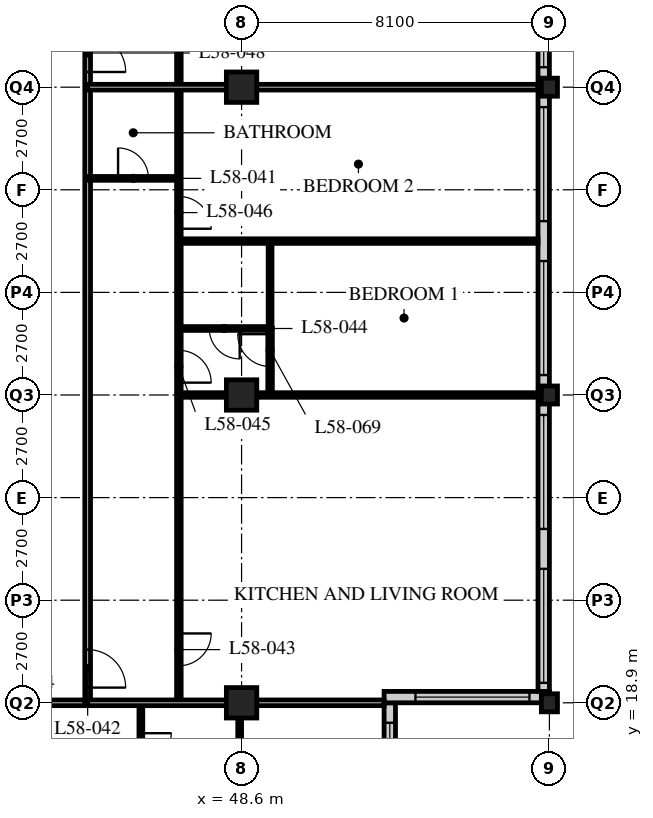
"""IFC4 building model, lengths in metres.
Left out: names, types, materials, properties, quantities, classifications, styles, units other than length and angle.
Written with IfcOpenShell. Run it as: python <this file> out.ifc"""

import sys

from ifc_helpers import new_model, si_unit, direction, frame, frame_2d, origin, origin_2d, place, context, subcontext, project, spatial, rectangle, hollow_rectangle, i_section, extrude, element, fill, save


model = new_model("IFC4")
c1 = context("Model", 3, precision=1e-05, world=origin(), true_north=direction((0.0, 1.0)))
c2 = subcontext(c1, "Body", "Model", "MODEL_VIEW")
j1 = project(units=[si_unit("LENGTHUNIT", "METRE"), si_unit("PLANEANGLEUNIT", "RADIAN")], contexts=[c1])
p1 = place(None, origin())
s1 = spatial("IfcSite", under=j1, at=p1, CompositionType="ELEMENT")
p2 = place(p1, origin())
s2 = spatial("IfcBuilding", under=s1, at=p2, CompositionType="ELEMENT")
p3 = place(p2, frame((0.0, 0.0, 224.4)))
s3 = spatial("IfcBuildingStorey", under=s2, at=p3, CompositionType="ELEMENT", Elevation=224.4)
for number, where, z_axis, x_axis in (
    (1, (48.6, 18.9, 0.0), (0.0, 0.0, 1.0), (1.0, 0.0, 0.0)),
    (2, (48.6, 27.0, 0.0), (0.0, 0.0, 1.0), (1.0, 0.0, 0.0)),
    (3, (48.6, 35.1, 0.0), (0.0, 0.0, 1.0), (1.0, 0.0, 0.0)),
):
    element("IfcColumn", number, at=place(p3, frame(where, z_axis=z_axis, x_axis=x_axis)), inside=s3, PredefinedType="COLUMN", context=c2, shape_type="SweptSolid", body=[
        extrude(hollow_rectangle(XDim=0.8, YDim=0.8, WallThickness=0.08, at=origin_2d()), origin(), (0.0, 0.0, 1.0), 3.6),
    ])
for number, where, z_axis, x_axis in (
    (4, (56.7, 18.9, 0.0), (0.0, 0.0, 1.0), (1.0, 0.0, 0.0)),
    (5, (56.7, 27.0, 0.0), (0.0, 0.0, 1.0), (1.0, 0.0, 0.0)),
    (6, (56.7, 35.1, 0.0), (0.0, 0.0, 1.0), (1.0, 0.0, 0.0)),
):
    element("IfcColumn", number, at=place(p3, frame(where, z_axis=z_axis, x_axis=x_axis)), inside=s3, PredefinedType="COLUMN", context=c2, shape_type="SweptSolid", body=[
        extrude(i_section(OverallWidth=0.424, OverallDepth=0.475, WebThickness=0.048, FlangeThickness=0.077, FilletRadius=0.015, at=origin_2d()), origin(), (0.0, 0.0, 1.0), 3.6),
    ])
p4 = place(p3, frame((52.5, 15.15, 0.0), z_axis=(0.0, 0.0, 1.0), x_axis=(0.0, 1.0, 0.0)))
e7 = element("IfcWall", 7, at=p4, inside=s3, PredefinedType="SOLIDWALL", context=c2, shape_type="SweptSolid", body=[
    extrude(rectangle(XDim=3.75, YDim=0.3, at=frame_2d((1.875, 0.0))), origin(), (0.0, 0.0, 1.0), 3.39),
])
p5 = place(p4, frame((0.225, 0.0, 0.6)))
e8 = element("IfcOpeningElement", 8, at=p5, cuts=e7, PredefinedType="OPENING", context=c2, shape_type="SweptSolid", body=[
    extrude(rectangle(XDim=3.0, YDim=2.0, at=frame_2d((1.5, 1.0))), frame((0.0, 0.16, 0.0), z_axis=(0.0, -1.0, 0.0), x_axis=(1.0, 0.0, 0.0)), (0.0, 0.0, 1.0), 0.32),
])
p6 = place(p3, frame((52.35, 19.05, 0.0), z_axis=(0.0, 0.0, 1.0), x_axis=(1.0, 0.0, 0.0)))
e9 = element("IfcWall", 9, at=p6, inside=s3, PredefinedType="SOLIDWALL", context=c2, shape_type="SweptSolid", body=[
    extrude(rectangle(XDim=4.35, YDim=0.3, at=frame_2d((2.175, 0.0))), origin(), (0.0, 0.0, 1.0), 3.39),
])
p7 = place(p6, frame((0.825, 0.0, 0.6)))
e10 = element("IfcOpeningElement", 10, at=p7, cuts=e9, PredefinedType="OPENING", context=c2, shape_type="SweptSolid", body=[
    extrude(rectangle(XDim=3.0, YDim=2.0, at=frame_2d((1.5, 1.0))), frame((0.0, 0.16, 0.0), z_axis=(0.0, -1.0, 0.0), x_axis=(1.0, 0.0, 0.0)), (0.0, 0.0, 1.0), 0.32),
])
p8 = place(p3, frame((56.55, 19.2, 0.0), z_axis=(0.0, 0.0, 1.0), x_axis=(0.0, 1.0, 0.0)))
e11 = element("IfcWall", 11, at=p8, inside=s3, PredefinedType="SOLIDWALL", context=c2, shape_type="SweptSolid", body=[
    extrude(rectangle(XDim=32.1, YDim=0.3, at=frame_2d((16.05, 0.0))), origin(), (0.0, 0.0, 1.0), 3.39),
])
p9 = place(p8, frame((0.225, 0.0, 0.6)))
e12 = element("IfcOpeningElement", 12, at=p9, cuts=e11, PredefinedType="OPENING", context=c2, shape_type="SweptSolid", body=[
    extrude(rectangle(XDim=3.0, YDim=2.0, at=frame_2d((1.5, 1.0))), frame((0.0, 0.16, 0.0), z_axis=(0.0, -1.0, 0.0), x_axis=(1.0, 0.0, 0.0)), (0.0, 0.0, 1.0), 0.32),
])
p10 = place(p8, frame((4.275, 0.0, 0.6)))
e13 = element("IfcOpeningElement", 13, at=p10, cuts=e11, PredefinedType="OPENING", context=c2, shape_type="SweptSolid", body=[
    extrude(rectangle(XDim=3.0, YDim=2.0, at=frame_2d((1.5, 1.0))), frame((0.0, 0.16, 0.0), z_axis=(0.0, -1.0, 0.0), x_axis=(1.0, 0.0, 0.0)), (0.0, 0.0, 1.0), 0.32),
])
p11 = place(p8, frame((8.325, 0.0, 0.6)))
e14 = element("IfcOpeningElement", 14, at=p11, cuts=e11, PredefinedType="OPENING", context=c2, shape_type="SweptSolid", body=[
    extrude(rectangle(XDim=3.0, YDim=2.0, at=frame_2d((1.5, 1.0))), frame((0.0, 0.16, 0.0), z_axis=(0.0, -1.0, 0.0), x_axis=(1.0, 0.0, 0.0)), (0.0, 0.0, 1.0), 0.32),
])
p12 = place(p8, frame((12.375, 0.0, 0.6)))
e15 = element("IfcOpeningElement", 15, at=p12, cuts=e11, PredefinedType="OPENING", context=c2, shape_type="SweptSolid", body=[
    extrude(rectangle(XDim=3.0, YDim=2.0, at=frame_2d((1.5, 1.0))), frame((0.0, 0.16, 0.0), z_axis=(0.0, -1.0, 0.0), x_axis=(1.0, 0.0, 0.0)), (0.0, 0.0, 1.0), 0.32),
])
p13 = place(p8, frame((16.425, 0.0, 0.6)))
e16 = element("IfcOpeningElement", 16, at=p13, cuts=e11, PredefinedType="OPENING", context=c2, shape_type="SweptSolid", body=[
    extrude(rectangle(XDim=3.0, YDim=2.0, at=frame_2d((1.5, 1.0))), frame((0.0, 0.16, 0.0), z_axis=(0.0, -1.0, 0.0), x_axis=(1.0, 0.0, 0.0)), (0.0, 0.0, 1.0), 0.32),
])
p14 = place(p8, frame((20.475, 0.0, 0.6)))
e17 = element("IfcOpeningElement", 17, at=p14, cuts=e11, PredefinedType="OPENING", context=c2, shape_type="SweptSolid", body=[
    extrude(rectangle(XDim=3.0, YDim=2.0, at=frame_2d((1.5, 1.0))), frame((0.0, 0.16, 0.0), z_axis=(0.0, -1.0, 0.0), x_axis=(1.0, 0.0, 0.0)), (0.0, 0.0, 1.0), 0.32),
])
p15 = place(p8, frame((24.525, 0.0, 0.6)))
e18 = element("IfcOpeningElement", 18, at=p15, cuts=e11, PredefinedType="OPENING", context=c2, shape_type="SweptSolid", body=[
    extrude(rectangle(XDim=3.0, YDim=2.0, at=frame_2d((1.5, 1.0))), frame((0.0, 0.16, 0.0), z_axis=(0.0, -1.0, 0.0), x_axis=(1.0, 0.0, 0.0)), (0.0, 0.0, 1.0), 0.32),
])
p16 = place(p8, frame((28.575, 0.0, 0.6)))
e19 = element("IfcOpeningElement", 19, at=p16, cuts=e11, PredefinedType="OPENING", context=c2, shape_type="SweptSolid", body=[
    extrude(rectangle(XDim=3.0, YDim=2.0, at=frame_2d((1.5, 1.0))), frame((0.0, 0.16, 0.0), z_axis=(0.0, -1.0, 0.0), x_axis=(1.0, 0.0, 0.0)), (0.0, 0.0, 1.0), 0.32),
])
p17 = place(p3, frame((8.1, 18.9, 0.0), z_axis=(0.0, 0.0, 1.0), x_axis=(1.0, 0.0, 0.0)))
e20 = element("IfcWall", 20, at=p17, inside=s3, PredefinedType="PARTITIONING", context=c2, shape_type="SweptSolid", body=[
    extrude(rectangle(XDim=36.45, YDim=0.15, at=frame_2d((18.225, 0.0))), origin(), (0.0, 0.0, 1.0), 2.628),
])
p18 = place(p17, frame((4.45, 0.0, 0.0)))
e21 = element("IfcOpeningElement", 21, at=p18, cuts=e20, PredefinedType="OPENING", context=c2, shape_type="SweptSolid", body=[
    extrude(rectangle(XDim=1.0, YDim=2.1, at=frame_2d((0.5, 1.05))), frame((0.0, 0.085, 0.0), z_axis=(0.0, -1.0, 0.0), x_axis=(1.0, 0.0, 0.0)), (0.0, 0.0, 1.0), 0.17),
])
p19 = place(p17, frame((17.1, 0.0, 0.0)))
e22 = element("IfcOpeningElement", 22, at=p19, cuts=e20, PredefinedType="OPENING", context=c2, shape_type="SweptSolid", body=[
    extrude(rectangle(XDim=1.0, YDim=2.1, at=frame_2d((0.5, 1.05))), frame((0.0, 0.085, 0.0), z_axis=(0.0, -1.0, 0.0), x_axis=(1.0, 0.0, 0.0)), (0.0, 0.0, 1.0), 0.17),
])
p20 = place(p17, frame((29.05, 0.0, 0.0)))
e23 = element("IfcOpeningElement", 23, at=p20, cuts=e20, PredefinedType="OPENING", context=c2, shape_type="SweptSolid", body=[
    extrude(rectangle(XDim=1.0, YDim=2.1, at=frame_2d((0.5, 1.05))), frame((0.0, 0.085, 0.0), z_axis=(0.0, -1.0, 0.0), x_axis=(1.0, 0.0, 0.0)), (0.0, 0.0, 1.0), 0.17),
])
p21 = place(p17, frame((2.625, 0.0, 0.0)))
e24 = element("IfcOpeningElement", 24, at=p21, cuts=e20, PredefinedType="OPENING", context=c2, shape_type="SweptSolid", body=[
    extrude(rectangle(XDim=1.0, YDim=2.1, at=frame_2d((0.5, 1.05))), frame((0.0, 0.085, 0.0), z_axis=(0.0, -1.0, 0.0), x_axis=(1.0, 0.0, 0.0)), (0.0, 0.0, 1.0), 0.17),
])
p22 = place(p17, frame((33.925, 0.0, 0.0)))
e25 = element("IfcOpeningElement", 25, at=p22, cuts=e20, PredefinedType="OPENING", context=c2, shape_type="SweptSolid", body=[
    extrude(rectangle(XDim=1.0, YDim=2.1, at=frame_2d((0.5, 1.05))), frame((0.0, 0.085, 0.0), z_axis=(0.0, -1.0, 0.0), x_axis=(1.0, 0.0, 0.0)), (0.0, 0.0, 1.0), 0.17),
])
p23 = place(p3, frame((44.55, 18.9, 0.0), z_axis=(0.0, 0.0, 1.0), x_axis=(0.0, 1.0, 0.0)))
e26 = element("IfcWall", 26, at=p23, inside=s3, PredefinedType="PARTITIONING", context=c2, shape_type="SweptSolid", body=[
    extrude(rectangle(XDim=24.3, YDim=0.15, at=frame_2d((12.15, 0.0))), origin(), (0.0, 0.0, 1.0), 3.39),
])
p24 = place(p23, frame((0.4, 0.0, 0.0)))
e27 = element("IfcOpeningElement", 27, at=p24, cuts=e26, PredefinedType="OPENING", context=c2, shape_type="SweptSolid", body=[
    extrude(rectangle(XDim=1.0, YDim=2.1, at=frame_2d((0.5, 1.05))), frame((0.0, 0.085, 0.0), z_axis=(0.0, -1.0, 0.0), x_axis=(1.0, 0.0, 0.0)), (0.0, 0.0, 1.0), 0.17),
])
p25 = place(p23, frame((16.6, 0.0, 0.0)))
e28 = element("IfcOpeningElement", 28, at=p25, cuts=e26, PredefinedType="OPENING", context=c2, shape_type="SweptSolid", body=[
    extrude(rectangle(XDim=1.0, YDim=2.1, at=frame_2d((0.5, 1.05))), frame((0.0, 0.085, 0.0), z_axis=(0.0, -1.0, 0.0), x_axis=(1.0, 0.0, 0.0)), (0.0, 0.0, 1.0), 0.17),
])
p26 = place(p3, frame((46.95, 18.9, 0.0), z_axis=(0.0, 0.0, 1.0), x_axis=(0.0, 1.0, 0.0)))
e29 = element("IfcWall", 29, at=p26, inside=s3, PredefinedType="PARTITIONING", context=c2, shape_type="SweptSolid", body=[
    extrude(rectangle(XDim=24.3, YDim=0.12, at=frame_2d((12.15, 0.0))), origin(), (0.0, 0.0, 1.0), 3.39),
])
p27 = place(p26, frame((0.975, 0.0, 0.0)))
e30 = element("IfcOpeningElement", 30, at=p27, cuts=e29, PredefinedType="OPENING", context=c2, shape_type="SweptSolid", body=[
    extrude(rectangle(XDim=0.85, YDim=2.1, at=frame_2d((0.425, 1.05))), frame((0.0, 0.07, 0.0), z_axis=(0.0, -1.0, 0.0), x_axis=(1.0, 0.0, 0.0)), (0.0, 0.0, 1.0), 0.14),
])
p28 = place(p26, frame((8.425, 0.0, 0.0)))
e31 = element("IfcOpeningElement", 31, at=p28, cuts=e29, PredefinedType="OPENING", context=c2, shape_type="SweptSolid", body=[
    extrude(rectangle(XDim=0.85, YDim=2.1, at=frame_2d((0.425, 1.05))), frame((0.0, 0.07, 0.0), z_axis=(0.0, -1.0, 0.0), x_axis=(1.0, 0.0, 0.0)), (0.0, 0.0, 1.0), 0.14),
])
p29 = place(p26, frame((12.475, 0.0, 0.0)))
e32 = element("IfcOpeningElement", 32, at=p29, cuts=e29, PredefinedType="OPENING", context=c2, shape_type="SweptSolid", body=[
    extrude(rectangle(XDim=0.85, YDim=2.1, at=frame_2d((0.425, 1.05))), frame((0.0, 0.07, 0.0), z_axis=(0.0, -1.0, 0.0), x_axis=(1.0, 0.0, 0.0)), (0.0, 0.0, 1.0), 0.14),
])
p30 = place(p26, frame((17.175, 0.0, 0.0)))
e33 = element("IfcOpeningElement", 33, at=p30, cuts=e29, PredefinedType="OPENING", context=c2, shape_type="SweptSolid", body=[
    extrude(rectangle(XDim=0.85, YDim=2.1, at=frame_2d((0.425, 1.05))), frame((0.0, 0.07, 0.0), z_axis=(0.0, -1.0, 0.0), x_axis=(1.0, 0.0, 0.0)), (0.0, 0.0, 1.0), 0.14),
])
p31 = place(p26, frame((20.575, 0.0, 0.0)))
e34 = element("IfcOpeningElement", 34, at=p31, cuts=e29, PredefinedType="OPENING", context=c2, shape_type="SweptSolid", body=[
    extrude(rectangle(XDim=0.85, YDim=2.1, at=frame_2d((0.425, 1.05))), frame((0.0, 0.07, 0.0), z_axis=(0.0, -1.0, 0.0), x_axis=(1.0, 0.0, 0.0)), (0.0, 0.0, 1.0), 0.14),
])
p32 = place(p3, frame((44.55, 32.7, 0.0), z_axis=(0.0, 0.0, 1.0), x_axis=(1.0, 0.0, 0.0)))
e35 = element("IfcWall", 35, at=p32, inside=s3, PredefinedType="PARTITIONING", context=c2, shape_type="SweptSolid", body=[
    extrude(rectangle(XDim=2.4, YDim=0.1, at=frame_2d((1.2, 0.0))), origin(), (0.0, 0.0, 1.0), 3.39),
])
p33 = place(p32, frame((0.8, 0.0, 0.0)))
e36 = element("IfcOpeningElement", 36, at=p33, cuts=e35, PredefinedType="OPENING", context=c2, shape_type="SweptSolid", body=[
    extrude(rectangle(XDim=0.8, YDim=2.1, at=frame_2d((0.4, 1.05))), frame((0.0, 0.06, 0.0), z_axis=(0.0, -1.0, 0.0), x_axis=(1.0, 0.0, 0.0)), (0.0, 0.0, 1.0), 0.12),
])
p34 = place(p3, frame((46.95, 28.75, 0.0), z_axis=(0.0, 0.0, 1.0), x_axis=(1.0, 0.0, 0.0)))
e37 = element("IfcWall", 37, at=p34, inside=s3, PredefinedType="PARTITIONING", context=c2, shape_type="SweptSolid", body=[
    extrude(rectangle(XDim=2.4, YDim=0.1, at=frame_2d((1.2, 0.0))), origin(), (0.0, 0.0, 1.0), 3.39),
])
p35 = place(p34, frame((0.8, 0.0, 0.0)))
e38 = element("IfcOpeningElement", 38, at=p35, cuts=e37, PredefinedType="OPENING", context=c2, shape_type="SweptSolid", body=[
    extrude(rectangle(XDim=0.8, YDim=2.1, at=frame_2d((0.4, 1.05))), frame((0.0, 0.06, 0.0), z_axis=(0.0, -1.0, 0.0), x_axis=(1.0, 0.0, 0.0)), (0.0, 0.0, 1.0), 0.12),
])
p36 = place(p3, frame((49.35, 28.75, 0.0), z_axis=(0.0, 0.0, 1.0), x_axis=(0.0, 1.0, 0.0)))
e39 = element("IfcWall", 39, at=p36, inside=s3, PredefinedType="PARTITIONING", context=c2, shape_type="SweptSolid", body=[
    extrude(rectangle(XDim=2.3, YDim=0.1, at=frame_2d((1.15, 0.0))), origin(), (0.0, 0.0, 1.0), 3.39),
])
p37 = place(p3, frame((46.95, 27.0, 0.0), z_axis=(0.0, 0.0, 1.0), x_axis=(1.0, 0.0, 0.0)))
e40 = element("IfcWall", 40, at=p37, inside=s3, PredefinedType="PARTITIONING", context=c2, shape_type="SweptSolid", body=[
    extrude(rectangle(XDim=9.45, YDim=0.12, at=frame_2d((4.725, 0.0))), origin(), (0.0, 0.0, 1.0), 2.628),
])
p38 = place(p3, frame((46.95, 31.05, 0.0), z_axis=(0.0, 0.0, 1.0), x_axis=(1.0, 0.0, 0.0)))
e41 = element("IfcWall", 41, at=p38, inside=s3, PredefinedType="PARTITIONING", context=c2, shape_type="SweptSolid", body=[
    extrude(rectangle(XDim=9.45, YDim=0.12, at=frame_2d((4.725, 0.0))), origin(), (0.0, 0.0, 1.0), 3.39),
])
p39 = place(p3, frame((44.55, 35.1, 0.0), z_axis=(0.0, 0.0, 1.0), x_axis=(1.0, 0.0, 0.0)))
e42 = element("IfcWall", 42, at=p39, inside=s3, PredefinedType="PARTITIONING", context=c2, shape_type="SweptSolid", body=[
    extrude(rectangle(XDim=11.85, YDim=0.15, at=frame_2d((5.925, 0.0))), origin(), (0.0, 0.0, 1.0), 2.628),
])
p40 = place(p3, frame((45.95, 18.9, 0.0), z_axis=(0.0, 0.0, 1.0), x_axis=(0.0, -1.0, 0.0)))
e43 = element("IfcWall", 43, at=p40, inside=s3, PredefinedType="PARTITIONING", context=c2, shape_type="SweptSolid", body=[
    extrude(rectangle(XDim=2.4, YDim=0.1, at=frame_2d((1.2, 0.0))), origin(), (0.0, 0.0, 1.0), 3.39),
])
p41 = place(p40, frame((0.8, 0.0, 0.0)))
e44 = element("IfcOpeningElement", 44, at=p41, cuts=e43, PredefinedType="OPENING", context=c2, shape_type="SweptSolid", body=[
    extrude(rectangle(XDim=0.8, YDim=2.1, at=frame_2d((0.4, 1.05))), frame((0.0, 0.06, 0.0), z_axis=(0.0, -1.0, 0.0), x_axis=(1.0, 0.0, 0.0)), (0.0, 0.0, 1.0), 0.12),
])
p42 = place(p3, frame((48.55, 18.9, 0.0), z_axis=(0.0, 0.0, 1.0), x_axis=(0.0, -1.0, 0.0)))
e45 = element("IfcWall", 45, at=p42, inside=s3, PredefinedType="PARTITIONING", context=c2, shape_type="SweptSolid", body=[
    extrude(rectangle(XDim=2.4, YDim=0.1, at=frame_2d((1.2, 0.0))), origin(), (0.0, 0.0, 1.0), 2.628),
])
p43 = place(p3, frame((44.55, 18.9, 0.0), z_axis=(0.0, 0.0, 1.0), x_axis=(1.0, 0.0, 0.0)))
e46 = element("IfcWall", 46, at=p43, inside=s3, PredefinedType="PARTITIONING", context=c2, shape_type="SweptSolid", body=[
    extrude(rectangle(XDim=7.8, YDim=0.15, at=frame_2d((3.9, 0.0))), origin(), (0.0, 0.0, 1.0), 2.628),
])
p44 = place(p3, frame((49.35, 28.76, 0.0), z_axis=(0.0, 0.0, 1.0), x_axis=(0.0, -1.0, 0.0)))
e47 = element("IfcWall", 47, at=p44, inside=s3, PredefinedType="PARTITIONING", context=c2, shape_type="SweptSolid", body=[
    extrude(rectangle(XDim=1.76, YDim=0.12, at=frame_2d((0.88, 0.0))), origin(), (0.0, 0.0, 1.0), 3.39),
])
p45 = place(p44, frame((0.16, 0.0, 0.0)))
e48 = element("IfcOpeningElement", 48, at=p45, cuts=e47, PredefinedType="OPENING", context=c2, shape_type="SweptSolid", body=[
    extrude(rectangle(XDim=0.85, YDim=2.1, at=frame_2d((0.425, 1.05))), frame((0.0, 0.07, 0.0), z_axis=(0.0, -1.0, 0.0), x_axis=(1.0, 0.0, 0.0)), (0.0, 0.0, 1.0), 0.14),
])
p46 = place(p5, origin())
e49 = element("IfcWindow", 49, at=p46, inside=s3, PartitioningType="SINGLE_PANEL", PredefinedType="WINDOW", context=c2, shape_type="SweptSolid", body=[
    extrude(rectangle(XDim=3.0, YDim=2.0, at=frame_2d((1.5, 1.0))), frame((0.0, 0.03, 0.0), z_axis=(0.0, -1.0, 0.0), x_axis=(1.0, 0.0, 0.0)), (0.0, 0.0, 1.0), 0.06),
])
fill(e8, e49)
p47 = place(p7, origin())
e50 = element("IfcWindow", 50, at=p47, inside=s3, PartitioningType="SINGLE_PANEL", PredefinedType="WINDOW", context=c2, shape_type="SweptSolid", body=[
    extrude(rectangle(XDim=3.0, YDim=2.0, at=frame_2d((1.5, 1.0))), frame((0.0, 0.03, 0.0), z_axis=(0.0, -1.0, 0.0), x_axis=(1.0, 0.0, 0.0)), (0.0, 0.0, 1.0), 0.06),
])
fill(e10, e50)
p48 = place(p9, origin())
e51 = element("IfcWindow", 51, at=p48, inside=s3, PartitioningType="SINGLE_PANEL", PredefinedType="WINDOW", context=c2, shape_type="SweptSolid", body=[
    extrude(rectangle(XDim=3.0, YDim=2.0, at=frame_2d((1.5, 1.0))), frame((0.0, 0.03, 0.0), z_axis=(0.0, -1.0, 0.0), x_axis=(1.0, 0.0, 0.0)), (0.0, 0.0, 1.0), 0.06),
])
fill(e12, e51)
p49 = place(p10, origin())
e52 = element("IfcWindow", 52, at=p49, inside=s3, PartitioningType="SINGLE_PANEL", PredefinedType="WINDOW", context=c2, shape_type="SweptSolid", body=[
    extrude(rectangle(XDim=3.0, YDim=2.0, at=frame_2d((1.5, 1.0))), frame((0.0, 0.03, 0.0), z_axis=(0.0, -1.0, 0.0), x_axis=(1.0, 0.0, 0.0)), (0.0, 0.0, 1.0), 0.06),
])
fill(e13, e52)
p50 = place(p11, origin())
e53 = element("IfcWindow", 53, at=p50, inside=s3, PartitioningType="SINGLE_PANEL", PredefinedType="WINDOW", context=c2, shape_type="SweptSolid", body=[
    extrude(rectangle(XDim=3.0, YDim=2.0, at=frame_2d((1.5, 1.0))), frame((0.0, 0.03, 0.0), z_axis=(0.0, -1.0, 0.0), x_axis=(1.0, 0.0, 0.0)), (0.0, 0.0, 1.0), 0.06),
])
fill(e14, e53)
p51 = place(p12, origin())
e54 = element("IfcWindow", 54, at=p51, inside=s3, PartitioningType="SINGLE_PANEL", PredefinedType="WINDOW", context=c2, shape_type="SweptSolid", body=[
    extrude(rectangle(XDim=3.0, YDim=2.0, at=frame_2d((1.5, 1.0))), frame((0.0, 0.03, 0.0), z_axis=(0.0, -1.0, 0.0), x_axis=(1.0, 0.0, 0.0)), (0.0, 0.0, 1.0), 0.06),
])
fill(e15, e54)
p52 = place(p13, origin())
e55 = element("IfcWindow", 55, at=p52, inside=s3, PartitioningType="SINGLE_PANEL", PredefinedType="WINDOW", context=c2, shape_type="SweptSolid", body=[
    extrude(rectangle(XDim=3.0, YDim=2.0, at=frame_2d((1.5, 1.0))), frame((0.0, 0.03, 0.0), z_axis=(0.0, -1.0, 0.0), x_axis=(1.0, 0.0, 0.0)), (0.0, 0.0, 1.0), 0.06),
])
fill(e16, e55)
p53 = place(p33, origin())
e56 = element("IfcDoor", 56, at=p53, inside=s3, OperationType="SINGLE_SWING_LEFT", PredefinedType="DOOR", context=c2, shape_type="SweptSolid", body=[
    extrude(rectangle(XDim=0.8, YDim=2.1, at=frame_2d((0.4, 1.05))), frame((0.0, 0.025, 0.0), z_axis=(0.0, -1.0, 0.0), x_axis=(1.0, 0.0, 0.0)), (0.0, 0.0, 1.0), 0.05),
])
fill(e36, e56)
p54 = place(p24, origin())
e57 = element("IfcDoor", 57, at=p54, inside=s3, OperationType="SINGLE_SWING_RIGHT", PredefinedType="DOOR", context=c2, shape_type="SweptSolid", body=[
    extrude(rectangle(XDim=1.0, YDim=2.1, at=frame_2d((0.5, 1.05))), frame((0.0, 0.025, 0.0), z_axis=(0.0, -1.0, 0.0), x_axis=(1.0, 0.0, 0.0)), (0.0, 0.0, 1.0), 0.05),
])
fill(e27, e57)
p55 = place(p27, origin())
e58 = element("IfcDoor", 58, at=p55, inside=s3, OperationType="SINGLE_SWING_LEFT", PredefinedType="DOOR", context=c2, shape_type="SweptSolid", body=[
    extrude(rectangle(XDim=0.85, YDim=2.1, at=frame_2d((0.425, 1.05))), frame((0.0, 0.025, 0.0), z_axis=(0.0, -1.0, 0.0), x_axis=(1.0, 0.0, 0.0)), (0.0, 0.0, 1.0), 0.05),
])
fill(e30, e58)
p56 = place(p35, origin())
e59 = element("IfcDoor", 59, at=p56, inside=s3, OperationType="SINGLE_SWING_LEFT", PredefinedType="DOOR", context=c2, shape_type="SweptSolid", body=[
    extrude(rectangle(XDim=0.8, YDim=2.1, at=frame_2d((0.4, 1.05))), frame((0.0, 0.025, 0.0), z_axis=(0.0, -1.0, 0.0), x_axis=(1.0, 0.0, 0.0)), (0.0, 0.0, 1.0), 0.05),
])
fill(e38, e59)
p57 = place(p28, origin())
e60 = element("IfcDoor", 60, at=p57, inside=s3, OperationType="SINGLE_SWING_RIGHT", PredefinedType="DOOR", context=c2, shape_type="SweptSolid", body=[
    extrude(rectangle(XDim=0.85, YDim=2.1, at=frame_2d((0.425, 1.05))), frame((0.0, 0.025, 0.0), z_axis=(0.0, -1.0, 0.0), x_axis=(1.0, 0.0, 0.0)), (0.0, 0.0, 1.0), 0.05),
])
fill(e31, e60)
p58 = place(p29, origin())
e61 = element("IfcDoor", 61, at=p58, inside=s3, OperationType="SINGLE_SWING_RIGHT", PredefinedType="DOOR", context=c2, shape_type="SweptSolid", body=[
    extrude(rectangle(XDim=0.85, YDim=2.1, at=frame_2d((0.425, 1.05))), frame((0.0, 0.025, 0.0), z_axis=(0.0, -1.0, 0.0), x_axis=(1.0, 0.0, 0.0)), (0.0, 0.0, 1.0), 0.05),
])
fill(e32, e61)
p59 = place(p25, origin())
e62 = element("IfcDoor", 62, at=p59, inside=s3, OperationType="SINGLE_SWING_RIGHT", PredefinedType="DOOR", context=c2, shape_type="SweptSolid", body=[
    extrude(rectangle(XDim=1.0, YDim=2.1, at=frame_2d((0.5, 1.05))), frame((0.0, 0.025, 0.0), z_axis=(0.0, -1.0, 0.0), x_axis=(1.0, 0.0, 0.0)), (0.0, 0.0, 1.0), 0.05),
])
fill(e28, e62)
p60 = place(p41, origin())
e63 = element("IfcDoor", 63, at=p60, inside=s3, OperationType="SINGLE_SWING_LEFT", PredefinedType="DOOR", context=c2, shape_type="SweptSolid", body=[
    extrude(rectangle(XDim=0.8, YDim=2.1, at=frame_2d((0.4, 1.05))), frame((0.0, 0.025, 0.0), z_axis=(0.0, -1.0, 0.0), x_axis=(1.0, 0.0, 0.0)), (0.0, 0.0, 1.0), 0.05),
])
fill(e44, e63)
p61 = place(p45, origin())
e64 = element("IfcDoor", 64, at=p61, inside=s3, OperationType="SINGLE_SWING_RIGHT", PredefinedType="DOOR", context=c2, shape_type="SweptSolid", body=[
    extrude(rectangle(XDim=0.85, YDim=2.1, at=frame_2d((0.425, 1.05))), frame((0.0, 0.025, 0.0), z_axis=(0.0, -1.0, 0.0), x_axis=(1.0, 0.0, 0.0)), (0.0, 0.0, 1.0), 0.05),
])
fill(e48, e64)
save(model, sys.argv[1])
